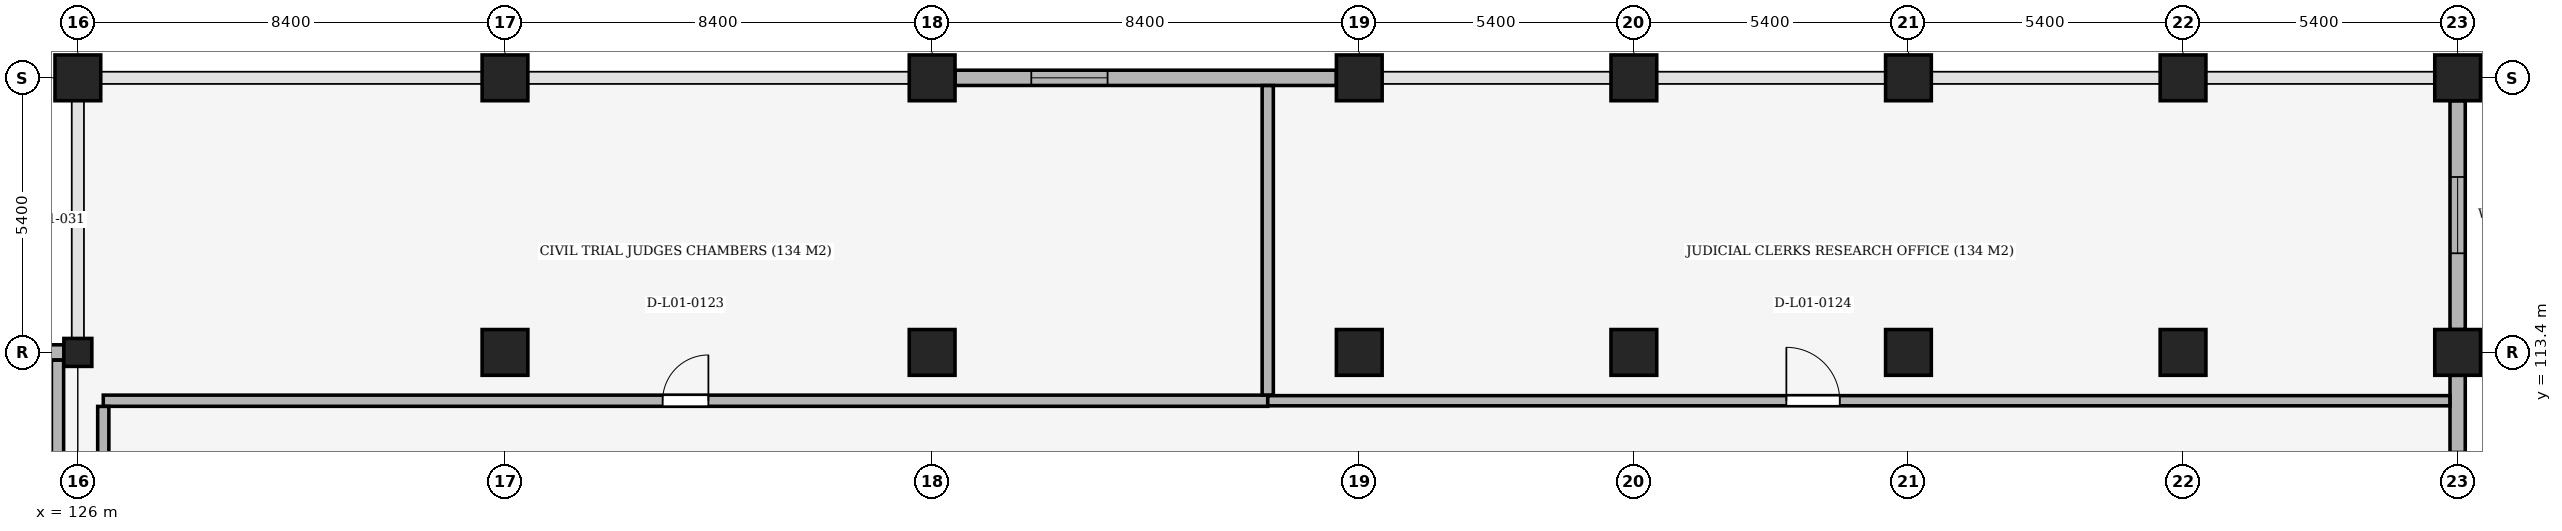
"""IFC4 building model, lengths in metres.
Left out: names, types, materials, properties, quantities, classifications, styles, units other than length and angle.
Written with IfcOpenShell. Run it as: python <this file> out.ifc"""

import sys

from ifc_helpers import new_model, si_unit, direction, frame, frame_2d, origin, origin_2d, place, context, subcontext, project, spatial, rectangle, extrude, element, fill, save


model = new_model("IFC4")
c1 = context("Model", 3, precision=1e-05, world=origin(), true_north=direction((0.0, 1.0)))
c2 = subcontext(c1, "Body", "Model", "MODEL_VIEW")
j1 = project(units=[si_unit("LENGTHUNIT", "METRE"), si_unit("PLANEANGLEUNIT", "RADIAN")], contexts=[c1])
p1 = place(None, origin())
s1 = spatial("IfcSite", under=j1, at=p1, CompositionType="ELEMENT")
p2 = place(p1, origin())
s2 = spatial("IfcBuilding", under=s1, at=p2, CompositionType="ELEMENT")
p3 = place(p2, frame((0.0, 0.0, 5.1)))
s3 = spatial("IfcBuildingStorey", under=s2, at=p3, CompositionType="ELEMENT", Elevation=5.1)
p4 = place(p3, frame((126.0, 113.4, 0.0), z_axis=(0.0, 0.0, 1.0), x_axis=(1.0, 0.0, 0.0)))
e1 = element("IfcColumn", 1, at=p4, inside=s3, PredefinedType="COLUMN", context=c2, shape_type="SweptSolid", body=[
    extrude(rectangle(XDim=0.55, YDim=0.55, at=origin_2d()), origin(), (0.0, 0.0, 1.0), 5.1),
])
for number, where, z_axis, x_axis in (
    (2, (126.0, 118.8, 0.0), (0.0, 0.0, 1.0), (1.0, 0.0, 0.0)),
    (3, (134.4, 113.4, 0.0), (0.0, 0.0, 1.0), (1.0, 0.0, 0.0)),
    (4, (134.4, 118.8, 0.0), (0.0, 0.0, 1.0), (1.0, 0.0, 0.0)),
    (5, (142.8, 113.4, 0.0), (0.0, 0.0, 1.0), (1.0, 0.0, 0.0)),
    (6, (142.8, 118.8, 0.0), (0.0, 0.0, 1.0), (1.0, 0.0, 0.0)),
    (7, (151.2, 113.4, 0.0), (0.0, 0.0, 1.0), (1.0, 0.0, 0.0)),
    (8, (151.2, 118.8, 0.0), (0.0, 0.0, 1.0), (1.0, 0.0, 0.0)),
    (9, (156.6, 113.4, 0.0), (0.0, 0.0, 1.0), (1.0, 0.0, 0.0)),
    (10, (156.6, 118.8, 0.0), (0.0, 0.0, 1.0), (1.0, 0.0, 0.0)),
    (11, (162.0, 113.4, 0.0), (0.0, 0.0, 1.0), (1.0, 0.0, 0.0)),
    (12, (162.0, 118.8, 0.0), (0.0, 0.0, 1.0), (1.0, 0.0, 0.0)),
    (13, (167.4, 113.4, 0.0), (0.0, 0.0, 1.0), (1.0, 0.0, 0.0)),
    (14, (167.4, 118.8, 0.0), (0.0, 0.0, 1.0), (1.0, 0.0, 0.0)),
    (15, (172.8, 113.4, 0.0), (0.0, 0.0, 1.0), (1.0, 0.0, 0.0)),
    (16, (172.8, 118.8, 0.0), (0.0, 0.0, 1.0), (1.0, 0.0, 0.0)),
):
    element("IfcColumn", number, at=place(p3, frame(where, z_axis=z_axis, x_axis=x_axis)), inside=s3, PredefinedType="COLUMN", context=c2, shape_type="SweptSolid", body=[
        extrude(rectangle(XDim=0.9, YDim=0.9, at=origin_2d()), origin(), (0.0, 0.0, 1.0), 5.1),
    ])
p5 = place(p3, frame((117.875, 113.4, 0.0), z_axis=(0.0, 0.0, 1.0), x_axis=(1.0, 0.0, 0.0)))
e17 = element("IfcWall", 17, at=p5, inside=s3, PredefinedType="SOLIDWALL", context=c2, shape_type="SweptSolid", body=[
    extrude(rectangle(XDim=7.85, YDim=0.3, at=frame_2d((3.925, 0.0))), origin(), (0.0, 0.0, 1.0), 4.12),
])
p6 = place(p5, frame((1.217, 0.0, 0.9)))
e18 = element("IfcOpeningElement", 18, at=p6, cuts=e17, PredefinedType="OPENING", context=c2, shape_type="SweptSolid", body=[
    extrude(rectangle(XDim=2.1, YDim=2.1, at=frame_2d((1.05, 1.05))), frame((0.0, 0.165, 0.0), z_axis=(0.0, -1.0, 0.0), x_axis=(1.0, 0.0, 0.0)), (0.0, 0.0, 1.0), 0.33),
])
p7 = place(p5, frame((4.533, 0.0, 0.9)))
e19 = element("IfcOpeningElement", 19, at=p7, cuts=e17, PredefinedType="OPENING", context=c2, shape_type="SweptSolid", body=[
    extrude(rectangle(XDim=2.1, YDim=2.1, at=frame_2d((1.05, 1.05))), frame((0.0, 0.165, 0.0), z_axis=(0.0, -1.0, 0.0), x_axis=(1.0, 0.0, 0.0)), (0.0, 0.0, 1.0), 0.33),
])
p8 = place(p3, frame((143.25, 118.8, 0.0), z_axis=(0.0, 0.0, 1.0), x_axis=(1.0, 0.0, 0.0)))
e20 = element("IfcWall", 20, at=p8, inside=s3, PredefinedType="SOLIDWALL", context=c2, shape_type="SweptSolid", body=[
    extrude(rectangle(XDim=7.5, YDim=0.3, at=frame_2d((3.75, 0.0))), origin(), (0.0, 0.0, 1.0), 4.12),
])
p9 = place(p8, frame((1.5, 0.0, 0.9)))
e21 = element("IfcOpeningElement", 21, at=p9, cuts=e20, PredefinedType="OPENING", context=c2, shape_type="SweptSolid", body=[
    extrude(rectangle(XDim=1.5, YDim=2.1, at=frame_2d((0.75, 1.05))), frame((0.0, 0.165, 0.0), z_axis=(0.0, -1.0, 0.0), x_axis=(1.0, 0.0, 0.0)), (0.0, 0.0, 1.0), 0.33),
])
p10 = place(p3, frame((172.8, 118.35, 0.0), z_axis=(0.0, 0.0, 1.0), x_axis=(0.0, -1.0, 0.0)))
e22 = element("IfcWall", 22, at=p10, inside=s3, PredefinedType="SOLIDWALL", context=c2, shape_type="SweptSolid", body=[
    extrude(rectangle(XDim=4.5, YDim=0.3, at=frame_2d((2.25, 0.0))), origin(), (0.0, 0.0, 1.0), 4.27),
])
p11 = place(p10, frame((1.5, 0.0, 0.9)))
e23 = element("IfcOpeningElement", 23, at=p11, cuts=e22, PredefinedType="OPENING", context=c2, shape_type="SweptSolid", body=[
    extrude(rectangle(XDim=1.5, YDim=2.1, at=frame_2d((0.75, 1.05))), frame((0.0, 0.165, 0.0), z_axis=(0.0, -1.0, 0.0), x_axis=(1.0, 0.0, 0.0)), (0.0, 0.0, 1.0), 0.33),
])
p12 = place(p3, frame((172.8, 112.95, 0.0), z_axis=(0.0, 0.0, 1.0), x_axis=(0.0, -1.0, 0.0)))
e24 = element("IfcWall", 24, at=p12, inside=s3, PredefinedType="SOLIDWALL", context=c2, shape_type="SweptSolid", body=[
    extrude(rectangle(XDim=4.5, YDim=0.3, at=frame_2d((2.25, 0.0))), origin(), (0.0, 0.0, 1.0), 4.27),
])
p13 = place(p12, frame((1.5, 0.0, 0.9)))
e25 = element("IfcOpeningElement", 25, at=p13, cuts=e24, PredefinedType="OPENING", context=c2, shape_type="SweptSolid", body=[
    extrude(rectangle(XDim=1.5, YDim=2.1, at=frame_2d((0.75, 1.05))), frame((0.0, 0.165, 0.0), z_axis=(0.0, -1.0, 0.0), x_axis=(1.0, 0.0, 0.0)), (0.0, 0.0, 1.0), 0.33),
])
p14 = place(p3, frame((126.5, 112.45, 0.0), z_axis=(0.0, 0.0, 1.0), x_axis=(1.0, 0.0, 0.0)))
e26 = element("IfcWall", 26, at=p14, inside=s3, PredefinedType="PARTITIONING", context=c2, shape_type="SweptSolid", body=[
    extrude(rectangle(XDim=22.9, YDim=0.22, at=frame_2d((11.45, 0.0))), origin(), (0.0, 0.0, 1.0), 4.27),
])
p15 = place(p14, frame((11.0, 0.0, 0.0)))
e27 = element("IfcOpeningElement", 27, at=p15, cuts=e26, PredefinedType="OPENING", context=c2, shape_type="SweptSolid", body=[
    extrude(rectangle(XDim=0.9, YDim=2.1, at=frame_2d((0.45, 1.05))), frame((0.0, 0.125, 0.0), z_axis=(0.0, -1.0, 0.0), x_axis=(1.0, 0.0, 0.0)), (0.0, 0.0, 1.0), 0.25),
])
p16 = place(p3, frame((149.4, 112.45, 0.0), z_axis=(0.0, 0.0, 1.0), x_axis=(1.0, 0.0, 0.0)))
e28 = element("IfcWall", 28, at=p16, inside=s3, PredefinedType="PARTITIONING", context=c2, shape_type="SweptSolid", body=[
    extrude(rectangle(XDim=23.248, YDim=0.2, at=frame_2d((11.624, 0.0))), origin(), (0.0, 0.0, 1.0), 4.27),
])
p17 = place(p16, frame((10.199, 0.0, 0.0)))
e29 = element("IfcOpeningElement", 29, at=p17, cuts=e28, PredefinedType="OPENING", context=c2, shape_type="SweptSolid", body=[
    extrude(rectangle(XDim=1.05, YDim=2.1, at=frame_2d((0.525, 1.05))), frame((0.0, 0.115, 0.0), z_axis=(0.0, -1.0, 0.0), x_axis=(1.0, 0.0, 0.0)), (0.0, 0.0, 1.0), 0.23),
])
p18 = place(p3, frame((125.6, 103.522, 0.0), z_axis=(0.0, 0.0, 1.0), x_axis=(0.0, 1.0, 0.0)))
e30 = element("IfcWall", 30, at=p18, inside=s3, PredefinedType="PARTITIONING", context=c2, shape_type="SweptSolid", body=[
    extrude(rectangle(XDim=9.726, YDim=0.24, at=frame_2d((4.863, 0.0))), origin(), (0.0, 0.0, 1.0), 4.12),
])
p19 = place(p3, frame((126.5, 108.55, 0.0), z_axis=(0.0, 0.0, 1.0), x_axis=(0.0, 1.0, 0.0)))
e31 = element("IfcWall", 31, at=p19, inside=s3, PredefinedType="PARTITIONING", context=c2, shape_type="SweptSolid", body=[
    extrude(rectangle(XDim=3.788, YDim=0.22, at=frame_2d((1.894, 0.0))), origin(), (0.0, 0.0, 1.0), 4.82),
])
p20 = place(p3, frame((149.4, 112.562, 0.0), z_axis=(0.0, 0.0, 1.0), x_axis=(0.0, 1.0, 0.0)))
e32 = element("IfcWall", 32, at=p20, inside=s3, PredefinedType="PARTITIONING", context=c2, shape_type="SweptSolid", body=[
    extrude(rectangle(XDim=6.086, YDim=0.22, at=frame_2d((3.043, 0.0))), origin(), (0.0, 0.0, 1.0), 4.12),
])
p21 = place(p9, origin())
e33 = element("IfcWindow", 33, at=p21, inside=s3, PartitioningType="SINGLE_PANEL", PredefinedType="WINDOW", context=c2, shape_type="SweptSolid", body=[
    extrude(rectangle(XDim=1.5, YDim=2.1, at=frame_2d((0.75, 1.05))), frame((0.0, 0.03, 0.0), z_axis=(0.0, -1.0, 0.0), x_axis=(1.0, 0.0, 0.0)), (0.0, 0.0, 1.0), 0.06),
])
fill(e21, e33)
p22 = place(p11, origin())
e34 = element("IfcWindow", 34, at=p22, inside=s3, PartitioningType="SINGLE_PANEL", PredefinedType="WINDOW", context=c2, shape_type="SweptSolid", body=[
    extrude(rectangle(XDim=1.5, YDim=2.1, at=frame_2d((0.75, 1.05))), frame((0.0, 0.03, 0.0), z_axis=(0.0, -1.0, 0.0), x_axis=(1.0, 0.0, 0.0)), (0.0, 0.0, 1.0), 0.06),
])
fill(e23, e34)
p23 = place(p15, origin())
e35 = element("IfcDoor", 35, at=p23, inside=s3, OperationType="SINGLE_SWING_RIGHT", PredefinedType="DOOR", context=c2, shape_type="SweptSolid", body=[
    extrude(rectangle(XDim=0.9, YDim=2.1, at=frame_2d((0.45, 1.05))), frame((0.0, 0.025, 0.0), z_axis=(0.0, -1.0, 0.0), x_axis=(1.0, 0.0, 0.0)), (0.0, 0.0, 1.0), 0.05),
])
fill(e27, e35)
p24 = place(p17, origin())
e36 = element("IfcDoor", 36, at=p24, inside=s3, OperationType="SINGLE_SWING_LEFT", PredefinedType="DOOR", context=c2, shape_type="SweptSolid", body=[
    extrude(rectangle(XDim=1.05, YDim=2.1, at=frame_2d((0.525, 1.05))), frame((0.0, 0.025, 0.0), z_axis=(0.0, -1.0, 0.0), x_axis=(1.0, 0.0, 0.0)), (0.0, 0.0, 1.0), 0.05),
])
fill(e29, e36)
save(model, sys.argv[1])
